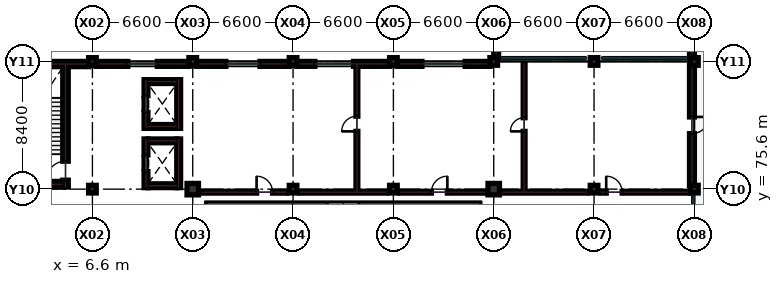
"""IFC4 building model, lengths in metres.
Left out: names, types, materials, properties, quantities, classifications, styles, units other than length and angle.
Written with IfcOpenShell. Run it as: python <this file> out.ifc"""

import sys

from ifc_helpers import new_model, si_unit, direction, frame, frame_2d, origin, origin_2d, place, context, subcontext, project, spatial, rectangle, circle, extrude, element, fill, save


model = new_model("IFC4")
c1 = context("Model", 3, precision=1e-05, world=origin(), true_north=direction((0.0, 1.0)))
c2 = subcontext(c1, "Body", "Model", "MODEL_VIEW")
j1 = project(units=[si_unit("LENGTHUNIT", "METRE"), si_unit("PLANEANGLEUNIT", "RADIAN")], contexts=[c1])
p1 = place(None, origin())
s1 = spatial("IfcSite", under=j1, at=p1, CompositionType="ELEMENT")
p2 = place(p1, origin())
s2 = spatial("IfcBuilding", under=s1, at=p2, CompositionType="ELEMENT")
p3 = place(p2, frame((0.0, 0.0, 5.4)))
s3 = spatial("IfcBuildingStorey", under=s2, at=p3, CompositionType="ELEMENT", Elevation=5.4)
for number, where, z_axis, x_axis in (
    (1, (6.6, 75.6, 0.0), (0.0, 0.0, 1.0), (1.0, 0.0, 0.0)),
    (2, (6.6, 84.0, 0.0), (0.0, 0.0, 1.0), (1.0, 0.0, 0.0)),
):
    element("IfcColumn", number, at=place(p3, frame(where, z_axis=z_axis, x_axis=x_axis)), inside=s3, PredefinedType="COLUMN", context=c2, shape_type="SweptSolid", body=[
        extrude(rectangle(XDim=0.5, YDim=0.5, at=origin_2d()), origin(), (0.0, 0.0, 1.0), 4.5),
    ])
p4 = place(p3, frame((13.2, 75.6, 0.0), z_axis=(0.0, 0.0, 1.0), x_axis=(1.0, 0.0, 0.0)))
e3 = element("IfcColumn", 3, at=p4, inside=s3, PredefinedType="COLUMN", context=c2, shape_type="SweptSolid", body=[
    extrude(circle(Radius=0.375, at=origin_2d()), origin(), (0.0, 0.0, 1.0), 4.5),
])
for number, where, z_axis, x_axis in (
    (4, (13.2, 84.0, 0.0), (0.0, 0.0, 1.0), (1.0, 0.0, 0.0)),
    (5, (19.8, 75.6, 0.0), (0.0, 0.0, 1.0), (1.0, 0.0, 0.0)),
    (6, (19.8, 84.0, 0.0), (0.0, 0.0, 1.0), (1.0, 0.0, 0.0)),
    (7, (26.4, 75.6, 0.0), (0.0, 0.0, 1.0), (1.0, 0.0, 0.0)),
    (8, (26.4, 84.0, 0.0), (0.0, 0.0, 1.0), (1.0, 0.0, 0.0)),
):
    element("IfcColumn", number, at=place(p3, frame(where, z_axis=z_axis, x_axis=x_axis)), inside=s3, PredefinedType="COLUMN", context=c2, shape_type="SweptSolid", body=[
        extrude(rectangle(XDim=0.5, YDim=0.5, at=origin_2d()), origin(), (0.0, 0.0, 1.0), 4.5),
    ])
p5 = place(p3, frame((33.0, 75.6, 0.0), z_axis=(0.0, 0.0, 1.0), x_axis=(1.0, 0.0, 0.0)))
e9 = element("IfcColumn", 9, at=p5, inside=s3, PredefinedType="COLUMN", context=c2, shape_type="SweptSolid", body=[
    extrude(circle(Radius=0.375, at=origin_2d()), origin(), (0.0, 0.0, 1.0), 4.5),
])
for number, where, z_axis, x_axis in (
    (10, (33.0, 84.0, 0.0), (0.0, 0.0, 1.0), (1.0, 0.0, 0.0)),
    (11, (39.6, 75.6, 0.0), (0.0, 0.0, 1.0), (1.0, 0.0, 0.0)),
    (12, (39.6, 84.0, 0.0), (0.0, 0.0, 1.0), (1.0, 0.0, 0.0)),
    (13, (46.2, 75.6, 0.0), (0.0, 0.0, 1.0), (1.0, 0.0, 0.0)),
    (14, (46.2, 84.0, 0.0), (0.0, 0.0, 1.0), (1.0, 0.0, 0.0)),
):
    element("IfcColumn", number, at=place(p3, frame(where, z_axis=z_axis, x_axis=x_axis)), inside=s3, PredefinedType="COLUMN", context=c2, shape_type="SweptSolid", body=[
        extrude(rectangle(XDim=0.5, YDim=0.5, at=origin_2d()), origin(), (0.0, 0.0, 1.0), 4.5),
    ])
p6 = place(p3, frame((12.9, 75.4, 0.0), z_axis=(0.0, 0.0, 1.0), x_axis=(1.0, 0.0, 0.0)))
e15 = element("IfcWall", 15, at=p6, inside=s3, PredefinedType="PARTITIONING", context=c2, shape_type="SweptSolid", body=[
    extrude(rectangle(XDim=6.45, YDim=0.12, at=frame_2d((3.225, 0.0))), origin(), (0.0, 0.0, 1.0), 3.45),
])
p7 = place(p6, frame((4.5, 0.0, 0.0)))
e16 = element("IfcOpeningElement", 16, at=p7, cuts=e15, PredefinedType="OPENING", context=c2, shape_type="SweptSolid", body=[
    extrude(rectangle(XDim=1.05, YDim=2.15, at=frame_2d((0.525, 1.075))), frame((0.0, 0.07, 0.0), z_axis=(0.0, -1.0, 0.0), x_axis=(1.0, 0.0, 0.0)), (0.0, 0.0, 1.0), 0.14),
])
p8 = place(p3, frame((20.25, 75.4, 0.0), z_axis=(0.0, 0.0, 1.0), x_axis=(1.0, 0.0, 0.0)))
e17 = element("IfcWall", 17, at=p8, inside=s3, PredefinedType="PARTITIONING", context=c2, shape_type="SweptSolid", body=[
    extrude(rectangle(XDim=5.7, YDim=0.12, at=frame_2d((2.85, 0.0))), origin(), (0.0, 0.0, 1.0), 3.45),
])
p9 = place(p3, frame((26.85, 75.4, 0.0), z_axis=(0.0, 0.0, 1.0), x_axis=(1.0, 0.0, 0.0)))
e18 = element("IfcWall", 18, at=p9, inside=s3, PredefinedType="PARTITIONING", context=c2, shape_type="SweptSolid", body=[
    extrude(rectangle(XDim=5.7, YDim=0.12, at=frame_2d((2.85, 0.0))), origin(), (0.0, 0.0, 1.0), 3.45),
])
p10 = place(p9, frame((2.05, 0.0, 0.0)))
e19 = element("IfcOpeningElement", 19, at=p10, cuts=e18, PredefinedType="OPENING", context=c2, shape_type="SweptSolid", body=[
    extrude(rectangle(XDim=1.05, YDim=2.15, at=frame_2d((0.525, 1.075))), frame((0.0, 0.07, 0.0), z_axis=(0.0, -1.0, 0.0), x_axis=(1.0, 0.0, 0.0)), (0.0, 0.0, 1.0), 0.14),
])
p11 = place(p3, frame((33.45, 75.4, 0.0), z_axis=(0.0, 0.0, 1.0), x_axis=(1.0, 0.0, 0.0)))
e20 = element("IfcWall", 20, at=p11, inside=s3, PredefinedType="PARTITIONING", context=c2, shape_type="SweptSolid", body=[
    extrude(rectangle(XDim=5.7, YDim=0.12, at=frame_2d((2.85, 0.0))), origin(), (0.0, 0.0, 1.0), 3.45),
])
p12 = place(p3, frame((40.05, 75.4, 0.0), z_axis=(0.0, 0.0, 1.0), x_axis=(1.0, 0.0, 0.0)))
e21 = element("IfcWall", 21, at=p12, inside=s3, PredefinedType="PARTITIONING", context=c2, shape_type="SweptSolid", body=[
    extrude(rectangle(XDim=5.9, YDim=0.12, at=frame_2d((2.95, 0.0))), origin(), (0.0, 0.0, 1.0), 3.45),
])
p13 = place(p12, frame((0.35, 0.0, 0.0)))
e22 = element("IfcOpeningElement", 22, at=p13, cuts=e21, PredefinedType="OPENING", context=c2, shape_type="SweptSolid", body=[
    extrude(rectangle(XDim=1.05, YDim=2.15, at=frame_2d((0.525, 1.075))), frame((0.0, 0.07, 0.0), z_axis=(0.0, -1.0, 0.0), x_axis=(1.0, 0.0, 0.0)), (0.0, 0.0, 1.0), 0.14),
])
p14 = place(p3, frame((24.0, 75.4, 0.0), z_axis=(0.0, 0.0, 1.0), x_axis=(0.0, 1.0, 0.0)))
e23 = element("IfcWall", 23, at=p14, inside=s3, PredefinedType="PARTITIONING", context=c2, shape_type="SweptSolid", body=[
    extrude(rectangle(XDim=8.46, YDim=0.12, at=frame_2d((4.23, 0.0))), origin(), (0.0, 0.0, 1.0), 3.45),
])
p15 = place(p14, frame((4.0, 0.0, 0.0)))
e24 = element("IfcOpeningElement", 24, at=p15, cuts=e23, PredefinedType="OPENING", context=c2, shape_type="SweptSolid", body=[
    extrude(rectangle(XDim=1.0, YDim=2.2, at=frame_2d((0.5, 1.1))), frame((0.0, 0.07, 0.0), z_axis=(0.0, -1.0, 0.0), x_axis=(1.0, 0.0, 0.0)), (0.0, 0.0, 1.0), 0.14),
])
p16 = place(p3, frame((35.0, 75.4, 0.0), z_axis=(0.0, 0.0, 1.0), x_axis=(0.0, 1.0, 0.0)))
e25 = element("IfcWall", 25, at=p16, inside=s3, PredefinedType="PARTITIONING", context=c2, shape_type="SweptSolid", body=[
    extrude(rectangle(XDim=8.46, YDim=0.12, at=frame_2d((4.23, 0.0))), origin(), (0.0, 0.0, 1.0), 3.45),
])
p17 = place(p16, frame((4.0, 0.0, 0.0)))
e26 = element("IfcOpeningElement", 26, at=p17, cuts=e25, PredefinedType="OPENING", context=c2, shape_type="SweptSolid", body=[
    extrude(rectangle(XDim=0.9, YDim=2.1, at=frame_2d((0.45, 1.05))), frame((0.0, 0.07, 0.0), z_axis=(0.0, -1.0, 0.0), x_axis=(1.0, 0.0, 0.0)), (0.0, 0.0, 1.0), 0.14),
])
p18 = place(p3, frame((6.355, 83.83, 0.0), z_axis=(0.0, 0.0, 1.0), x_axis=(-1.0, 0.0, 0.0)))
e27 = element("IfcWall", 27, at=p18, inside=s3, PredefinedType="SHEAR", context=c2, shape_type="SweptSolid", body=[
    extrude(rectangle(XDim=6.11, YDim=0.34, at=frame_2d((3.055, 0.0))), origin(), (0.0, 0.0, 1.0), 4.2),
])
p19 = place(p3, frame((12.955, 83.84, 0.0), z_axis=(0.0, 0.0, 1.0), x_axis=(-1.0, 0.0, 0.0)))
e28 = element("IfcWall", 28, at=p19, inside=s3, PredefinedType="SOLIDWALL", context=c2, shape_type="SweptSolid", body=[
    extrude(rectangle(XDim=6.11, YDim=0.32, at=frame_2d((3.055, 0.0))), origin(), (0.0, 0.0, 1.0), 3.585),
])
p20 = place(p19, frame((2.08, 0.0, 0.95)))
e29 = element("IfcOpeningElement", 29, at=p20, cuts=e28, PredefinedType="OPENING", context=c2, shape_type="SweptSolid", body=[
    extrude(rectangle(XDim=1.95, YDim=1.55, at=frame_2d((0.975, 0.775))), frame((0.0, 0.17, 0.0), z_axis=(0.0, -1.0, 0.0), x_axis=(1.0, 0.0, 0.0)), (0.0, 0.0, 1.0), 0.34),
])
p21 = place(p3, frame((19.555, 83.84, 0.0), z_axis=(0.0, 0.0, 1.0), x_axis=(-1.0, 0.0, 0.0)))
e30 = element("IfcWall", 30, at=p21, inside=s3, PredefinedType="SOLIDWALL", context=c2, shape_type="SweptSolid", body=[
    extrude(rectangle(XDim=6.11, YDim=0.32, at=frame_2d((3.055, 0.0))), origin(), (0.0, 0.0, 1.0), 3.585),
])
p22 = place(p21, frame((1.93, 0.0, 0.95)))
e31 = element("IfcOpeningElement", 31, at=p22, cuts=e30, PredefinedType="OPENING", context=c2, shape_type="SweptSolid", body=[
    extrude(rectangle(XDim=2.25, YDim=1.55, at=frame_2d((1.125, 0.775))), frame((0.0, 0.17, 0.0), z_axis=(0.0, -1.0, 0.0), x_axis=(1.0, 0.0, 0.0)), (0.0, 0.0, 1.0), 0.34),
])
p23 = place(p3, frame((26.155, 83.84, 0.0), z_axis=(0.0, 0.0, 1.0), x_axis=(-1.0, 0.0, 0.0)))
e32 = element("IfcWall", 32, at=p23, inside=s3, PredefinedType="SOLIDWALL", context=c2, shape_type="SweptSolid", body=[
    extrude(rectangle(XDim=6.11, YDim=0.32, at=frame_2d((3.055, 0.0))), origin(), (0.0, 0.0, 1.0), 3.585),
])
p24 = place(p23, frame((2.375, 0.0, 0.95)))
e33 = element("IfcOpeningElement", 33, at=p24, cuts=e32, PredefinedType="OPENING", context=c2, shape_type="SweptSolid", body=[
    extrude(rectangle(XDim=2.55, YDim=1.65, at=frame_2d((1.275, 0.825))), frame((0.0, 0.17, 0.0), z_axis=(0.0, -1.0, 0.0), x_axis=(1.0, 0.0, 0.0)), (0.0, 0.0, 1.0), 0.34),
])
p25 = place(p3, frame((32.755, 83.84, 0.0), z_axis=(0.0, 0.0, 1.0), x_axis=(-1.0, 0.0, 0.0)))
e34 = element("IfcWall", 34, at=p25, inside=s3, PredefinedType="SOLIDWALL", context=c2, shape_type="SweptSolid", body=[
    extrude(rectangle(XDim=6.11, YDim=0.32, at=frame_2d((3.055, 0.0))), origin(), (0.0, 0.0, 1.0), 3.585),
])
p26 = place(p25, frame((1.63, 0.0, 0.95)))
e35 = element("IfcOpeningElement", 35, at=p26, cuts=e34, PredefinedType="OPENING", context=c2, shape_type="SweptSolid", body=[
    extrude(rectangle(XDim=2.85, YDim=1.65, at=frame_2d((1.425, 0.825))), frame((0.0, 0.17, 0.0), z_axis=(0.0, -1.0, 0.0), x_axis=(1.0, 0.0, 0.0)), (0.0, 0.0, 1.0), 0.34),
])
p27 = place(p3, frame((33.16, 92.155, 0.0), z_axis=(0.0, 0.0, 1.0), x_axis=(0.0, -1.0, 0.0)))
e36 = element("IfcWall", 36, at=p27, inside=s3, PredefinedType="SOLIDWALL", context=c2, shape_type="SweptSolid", body=[
    extrude(rectangle(XDim=7.91, YDim=0.32, at=frame_2d((3.955, 0.0))), origin(), (0.0, 0.0, 1.0), 3.485),
])
p28 = place(p27, frame((3.205, 0.0, 0.95)))
e37 = element("IfcOpeningElement", 37, at=p28, cuts=e36, PredefinedType="OPENING", context=c2, shape_type="SweptSolid", body=[
    extrude(rectangle(XDim=1.5, YDim=2.1, at=frame_2d((0.75, 1.05))), frame((0.0, 0.17, 0.0), z_axis=(0.0, -1.0, 0.0), x_axis=(1.0, 0.0, 0.0)), (0.0, 0.0, 1.0), 0.34),
])
p29 = place(p3, frame((46.04, 75.845, 0.0), z_axis=(0.0, 0.0, 1.0), x_axis=(0.0, 1.0, 0.0)))
e38 = element("IfcWall", 38, at=p29, inside=s3, PredefinedType="SOLIDWALL", context=c2, shape_type="SweptSolid", body=[
    extrude(rectangle(XDim=7.91, YDim=0.32, at=frame_2d((3.955, 0.0))), origin(), (0.0, 0.0, 1.0), 3.635),
])
p30 = place(p29, frame((3.405, 0.0, 0.0)))
e39 = element("IfcOpeningElement", 39, at=p30, cuts=e38, PredefinedType="OPENING", context=c2, shape_type="SweptSolid", body=[
    extrude(rectangle(XDim=1.1, YDim=2.2, at=frame_2d((0.55, 1.1))), frame((0.0, 0.17, 0.0), z_axis=(0.0, -1.0, 0.0), x_axis=(1.0, 0.0, 0.0)), (0.0, 0.0, 1.0), 0.34),
])
p31 = place(p3, frame((46.04, 84.245, 0.0), z_axis=(0.0, 0.0, 1.0), x_axis=(0.0, 1.0, 0.0)))
e40 = element("IfcWall", 40, at=p31, inside=s3, PredefinedType="SOLIDWALL", context=c2, shape_type="SweptSolid", body=[
    extrude(rectangle(XDim=7.91, YDim=0.32, at=frame_2d((3.955, 0.0))), origin(), (0.0, 0.0, 1.0), 3.485),
])
p32 = place(p31, frame((3.205, 0.0, 0.95)))
e41 = element("IfcOpeningElement", 41, at=p32, cuts=e40, PredefinedType="OPENING", context=c2, shape_type="SweptSolid", body=[
    extrude(rectangle(XDim=1.5, YDim=2.1, at=frame_2d((0.75, 1.05))), frame((0.0, 0.17, 0.0), z_axis=(0.0, -1.0, 0.0), x_axis=(1.0, 0.0, 0.0)), (0.0, 0.0, 1.0), 0.34),
])
p33 = place(p3, frame((4.83, 75.74, 0.0), z_axis=(0.0, 0.0, 1.0), x_axis=(0.0, 1.0, 0.0)))
e42 = element("IfcWall", 42, at=p33, inside=s3, PredefinedType="SHEAR", context=c2, shape_type="SweptSolid", body=[
    extrude(rectangle(XDim=8.09, YDim=0.36, at=frame_2d((4.045, 0.0))), origin(), (0.0, 0.0, 1.0), 4.2),
])
p34 = place(p33, frame((0.45, 0.0, 0.0)))
e43 = element("IfcOpeningElement", 43, at=p34, cuts=e42, PredefinedType="OPENING", context=c2, shape_type="SweptSolid", body=[
    extrude(rectangle(XDim=1.25, YDim=2.15, at=frame_2d((0.625, 1.075))), frame((0.0, 0.19, 0.0), z_axis=(0.0, -1.0, 0.0), x_axis=(1.0, 0.0, 0.0)), (0.0, 0.0, 1.0), 0.38),
])
p35 = place(p3, frame((0.85, 75.92, 0.0), z_axis=(0.0, 0.0, 1.0), x_axis=(1.0, 0.0, 0.0)))
e44 = element("IfcWall", 44, at=p35, inside=s3, PredefinedType="SHEAR", context=c2, shape_type="SweptSolid", body=[
    extrude(rectangle(XDim=3.8, YDim=0.36, at=frame_2d((1.9, 0.0))), origin(), (0.0, 0.0, 1.0), 4.2),
])
p36 = place(p3, frame((10.125, 75.7, 0.0), z_axis=(0.0, 0.0, 1.0), x_axis=(0.0, 1.0, 0.0)))
e45 = element("IfcWall", 45, at=p36, inside=s3, PredefinedType="SHEAR", context=c2, shape_type="SweptSolid", body=[
    extrude(rectangle(XDim=3.2, YDim=0.25, at=frame_2d((1.6, 0.0))), origin(), (0.0, 0.0, 1.0), 4.2),
])
p37 = place(p36, frame((1.05, 0.0, 0.0)))
e46 = element("IfcOpeningElement", 46, at=p37, cuts=e45, PredefinedType="OPENING", context=c2, shape_type="SweptSolid", body=[
    extrude(rectangle(XDim=1.1, YDim=2.15, at=frame_2d((0.55, 1.075))), frame((0.0, 0.135, 0.0), z_axis=(0.0, -1.0, 0.0), x_axis=(1.0, 0.0, 0.0)), (0.0, 0.0, 1.0), 0.27),
])
p38 = place(p3, frame((12.275, 75.7, 0.0), z_axis=(0.0, 0.0, 1.0), x_axis=(0.0, 1.0, 0.0)))
e47 = element("IfcWall", 47, at=p38, inside=s3, PredefinedType="SHEAR", context=c2, shape_type="SweptSolid", body=[
    extrude(rectangle(XDim=3.2, YDim=0.25, at=frame_2d((1.6, 0.0))), origin(), (0.0, 0.0, 1.0), 4.2),
])
for number, where, z_axis, x_axis in (
    (48, (10.25, 75.825, 0.0), (0.0, 0.0, 1.0), (1.0, 0.0, 0.0)),
    (49, (10.25, 78.775, 0.0), (0.0, 0.0, 1.0), (1.0, 0.0, 0.0)),
):
    element("IfcWall", number, at=place(p3, frame(where, z_axis=z_axis, x_axis=x_axis)), inside=s3, PredefinedType="SHEAR", context=c2, shape_type="SweptSolid", body=[
        extrude(rectangle(XDim=1.9, YDim=0.25, at=frame_2d((0.95, 0.0))), origin(), (0.0, 0.0, 1.0), 4.2),
    ])
p39 = place(p3, frame((10.125, 79.6, 0.0), z_axis=(0.0, 0.0, 1.0), x_axis=(0.0, 1.0, 0.0)))
e50 = element("IfcWall", 50, at=p39, inside=s3, PredefinedType="SHEAR", context=c2, shape_type="SweptSolid", body=[
    extrude(rectangle(XDim=3.2, YDim=0.25, at=frame_2d((1.6, 0.0))), origin(), (0.0, 0.0, 1.0), 4.2),
])
p40 = place(p39, frame((1.05, 0.0, 0.0)))
e51 = element("IfcOpeningElement", 51, at=p40, cuts=e50, PredefinedType="OPENING", context=c2, shape_type="SweptSolid", body=[
    extrude(rectangle(XDim=1.1, YDim=2.15, at=frame_2d((0.55, 1.075))), frame((0.0, 0.135, 0.0), z_axis=(0.0, -1.0, 0.0), x_axis=(1.0, 0.0, 0.0)), (0.0, 0.0, 1.0), 0.27),
])
p41 = place(p3, frame((12.275, 79.6, 0.0), z_axis=(0.0, 0.0, 1.0), x_axis=(0.0, 1.0, 0.0)))
e52 = element("IfcWall", 52, at=p41, inside=s3, PredefinedType="SHEAR", context=c2, shape_type="SweptSolid", body=[
    extrude(rectangle(XDim=3.2, YDim=0.25, at=frame_2d((1.6, 0.0))), origin(), (0.0, 0.0, 1.0), 4.2),
])
for number, where, z_axis, x_axis in (
    (53, (10.25, 79.725, 0.0), (0.0, 0.0, 1.0), (1.0, 0.0, 0.0)),
    (54, (10.25, 82.675, 0.0), (0.0, 0.0, 1.0), (1.0, 0.0, 0.0)),
):
    element("IfcWall", number, at=place(p3, frame(where, z_axis=z_axis, x_axis=x_axis)), inside=s3, PredefinedType="SHEAR", context=c2, shape_type="SweptSolid", body=[
        extrude(rectangle(XDim=1.9, YDim=0.25, at=frame_2d((0.95, 0.0))), origin(), (0.0, 0.0, 1.0), 4.2),
    ])
p42 = place(p7, origin())
e55 = element("IfcDoor", 55, at=p42, inside=s3, OperationType="SINGLE_SWING_LEFT", PredefinedType="DOOR", context=c2, shape_type="SweptSolid", body=[
    extrude(rectangle(XDim=1.05, YDim=2.15, at=frame_2d((0.525, 1.075))), frame((0.0, 0.025, 0.0), z_axis=(0.0, -1.0, 0.0), x_axis=(1.0, 0.0, 0.0)), (0.0, 0.0, 1.0), 0.05),
])
fill(e16, e55)
p43 = place(p10, origin())
e56 = element("IfcDoor", 56, at=p43, inside=s3, OperationType="SINGLE_SWING_RIGHT", PredefinedType="DOOR", context=c2, shape_type="SweptSolid", body=[
    extrude(rectangle(XDim=1.05, YDim=2.15, at=frame_2d((0.525, 1.075))), frame((0.0, 0.025, 0.0), z_axis=(0.0, -1.0, 0.0), x_axis=(1.0, 0.0, 0.0)), (0.0, 0.0, 1.0), 0.05),
])
fill(e19, e56)
p44 = place(p13, origin())
e57 = element("IfcDoor", 57, at=p44, inside=s3, OperationType="SINGLE_SWING_LEFT", PredefinedType="DOOR", context=c2, shape_type="SweptSolid", body=[
    extrude(rectangle(XDim=1.05, YDim=2.15, at=frame_2d((0.525, 1.075))), frame((0.0, 0.025, 0.0), z_axis=(0.0, -1.0, 0.0), x_axis=(1.0, 0.0, 0.0)), (0.0, 0.0, 1.0), 0.05),
])
fill(e22, e57)
p45 = place(p15, origin())
e58 = element("IfcDoor", 58, at=p45, inside=s3, OperationType="SINGLE_SWING_LEFT", PredefinedType="DOOR", context=c2, shape_type="SweptSolid", body=[
    extrude(rectangle(XDim=1.0, YDim=2.2, at=frame_2d((0.5, 1.1))), frame((0.0, 0.025, 0.0), z_axis=(0.0, -1.0, 0.0), x_axis=(1.0, 0.0, 0.0)), (0.0, 0.0, 1.0), 0.05),
])
fill(e24, e58)
p46 = place(p17, origin())
e59 = element("IfcDoor", 59, at=p46, inside=s3, OperationType="SINGLE_SWING_LEFT", PredefinedType="DOOR", context=c2, shape_type="SweptSolid", body=[
    extrude(rectangle(XDim=0.9, YDim=2.1, at=frame_2d((0.45, 1.05))), frame((0.0, 0.025, 0.0), z_axis=(0.0, -1.0, 0.0), x_axis=(1.0, 0.0, 0.0)), (0.0, 0.0, 1.0), 0.05),
])
fill(e26, e59)
p47 = place(p20, origin())
e60 = element("IfcWindow", 60, at=p47, inside=s3, PartitioningType="SINGLE_PANEL", PredefinedType="WINDOW", context=c2, shape_type="SweptSolid", body=[
    extrude(rectangle(XDim=1.95, YDim=1.55, at=frame_2d((0.975, 0.775))), frame((0.0, 0.03, 0.0), z_axis=(0.0, -1.0, 0.0), x_axis=(1.0, 0.0, 0.0)), (0.0, 0.0, 1.0), 0.06),
])
fill(e29, e60)
p48 = place(p22, origin())
e61 = element("IfcWindow", 61, at=p48, inside=s3, PartitioningType="SINGLE_PANEL", PredefinedType="WINDOW", context=c2, shape_type="SweptSolid", body=[
    extrude(rectangle(XDim=2.25, YDim=1.55, at=frame_2d((1.125, 0.775))), frame((0.0, 0.03, 0.0), z_axis=(0.0, -1.0, 0.0), x_axis=(1.0, 0.0, 0.0)), (0.0, 0.0, 1.0), 0.06),
])
fill(e31, e61)
p49 = place(p24, origin())
e62 = element("IfcWindow", 62, at=p49, inside=s3, PartitioningType="SINGLE_PANEL", PredefinedType="WINDOW", context=c2, shape_type="SweptSolid", body=[
    extrude(rectangle(XDim=2.55, YDim=1.65, at=frame_2d((1.275, 0.825))), frame((0.0, 0.03, 0.0), z_axis=(0.0, -1.0, 0.0), x_axis=(1.0, 0.0, 0.0)), (0.0, 0.0, 1.0), 0.06),
])
fill(e33, e62)
p50 = place(p26, origin())
e63 = element("IfcWindow", 63, at=p50, inside=s3, PartitioningType="SINGLE_PANEL", PredefinedType="WINDOW", context=c2, shape_type="SweptSolid", body=[
    extrude(rectangle(XDim=2.85, YDim=1.65, at=frame_2d((1.425, 0.825))), frame((0.0, 0.03, 0.0), z_axis=(0.0, -1.0, 0.0), x_axis=(1.0, 0.0, 0.0)), (0.0, 0.0, 1.0), 0.06),
])
fill(e35, e63)
p51 = place(p30, frame((1.1, 0.0, 0.0), z_axis=(0.0, 0.0, 1.0), x_axis=(-1.0, 0.0, 0.0)))
e64 = element("IfcDoor", 64, at=p51, inside=s3, OperationType="SINGLE_SWING_RIGHT", PredefinedType="DOOR", context=c2, shape_type="SweptSolid", body=[
    extrude(rectangle(XDim=1.1, YDim=2.2, at=frame_2d((0.55, 1.1))), frame((0.0, 0.025, 0.0), z_axis=(0.0, -1.0, 0.0), x_axis=(1.0, 0.0, 0.0)), (0.0, 0.0, 1.0), 0.05),
])
fill(e39, e64)
p52 = place(p34, origin())
e65 = element("IfcDoor", 65, at=p52, inside=s3, OperationType="SINGLE_SWING_LEFT", PredefinedType="DOOR", context=c2, shape_type="SweptSolid", body=[
    extrude(rectangle(XDim=1.25, YDim=2.15, at=frame_2d((0.625, 1.075))), frame((0.0, 0.025, 0.0), z_axis=(0.0, -1.0, 0.0), x_axis=(1.0, 0.0, 0.0)), (0.0, 0.0, 1.0), 0.05),
])
fill(e43, e65)
p53 = place(p37, origin())
e66 = element("IfcDoor", 66, at=p53, inside=s3, OperationType="SLIDING_TO_LEFT", PredefinedType="DOOR", context=c2, shape_type="SweptSolid", body=[
    extrude(rectangle(XDim=1.1, YDim=2.15, at=frame_2d((0.55, 1.075))), frame((0.0, 0.025, 0.0), z_axis=(0.0, -1.0, 0.0), x_axis=(1.0, 0.0, 0.0)), (0.0, 0.0, 1.0), 0.05),
])
fill(e46, e66)
p54 = place(p40, origin())
e67 = element("IfcDoor", 67, at=p54, inside=s3, OperationType="SLIDING_TO_LEFT", PredefinedType="DOOR", context=c2, shape_type="SweptSolid", body=[
    extrude(rectangle(XDim=1.1, YDim=2.15, at=frame_2d((0.55, 1.075))), frame((0.0, 0.025, 0.0), z_axis=(0.0, -1.0, 0.0), x_axis=(1.0, 0.0, 0.0)), (0.0, 0.0, 1.0), 0.05),
])
fill(e51, e67)
save(model, sys.argv[1])
